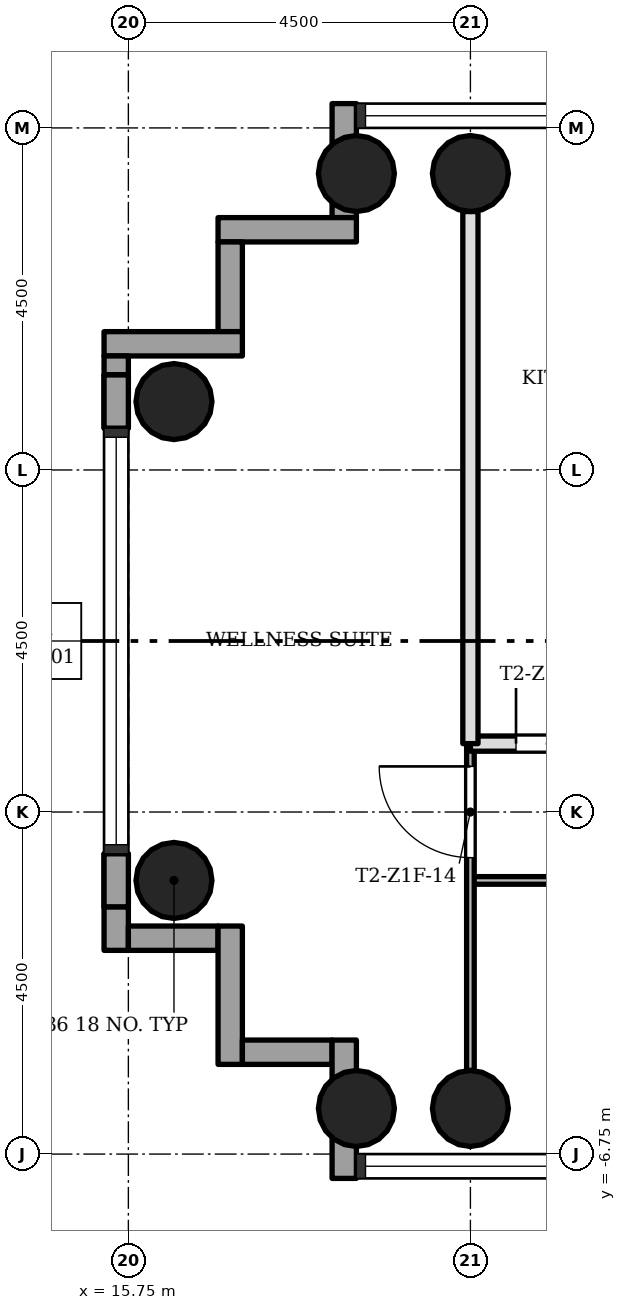
"""IFC4 building model, lengths in metres.
Left out: names, types, materials, properties, quantities, classifications, styles, units other than length and angle.
Written with IfcOpenShell. Run it as: python <this file> out.ifc"""

import sys

from ifc_helpers import new_model, si_unit, direction, frame, frame_2d, origin, origin_2d, place, context, subcontext, project, spatial, rectangle, hollow_circle, extrude, element, fill, save


model = new_model("IFC4")
c1 = context("Model", 3, precision=1e-05, world=origin(), true_north=direction((0.0, 1.0)))
c2 = subcontext(c1, "Body", "Model", "MODEL_VIEW")
j1 = project(units=[si_unit("LENGTHUNIT", "METRE"), si_unit("PLANEANGLEUNIT", "RADIAN")], contexts=[c1])
p1 = place(None, origin())
s1 = spatial("IfcSite", under=j1, at=p1, CompositionType="ELEMENT")
p2 = place(p1, origin())
s2 = spatial("IfcBuilding", under=s1, at=p2, CompositionType="ELEMENT")
p3 = place(p2, frame((0.0, 0.0, 68.7)))
s3 = spatial("IfcBuildingStorey", under=s2, at=p3, CompositionType="ELEMENT", Elevation=68.7)
for number, where, z_axis, x_axis in (
    (1, (20.25, 6.15, 0.0), (0.0, 0.0, 1.0), (1.0, 0.0, 0.0)),
    (2, (20.25, -6.15, 0.0), (0.0, 0.0, 1.0), (1.0, 0.0, 0.0)),
    (3, (18.75, 6.15, 0.0), (0.0, 0.0, 1.0), (1.0, 0.0, 0.0)),
    (4, (18.75, -6.15, 0.0), (0.0, 0.0, 1.0), (1.0, 0.0, 0.0)),
    (5, (16.35, 3.15, 0.0), (0.0, 0.0, 1.0), (1.0, 0.0, 0.0)),
    (6, (16.35, -3.15, 0.0), (0.0, 0.0, 1.0), (1.0, 0.0, 0.0)),
):
    element("IfcColumn", number, at=place(p3, frame(where, z_axis=z_axis, x_axis=x_axis)), inside=s3, PredefinedType="COLUMN", context=c2, shape_type="SweptSolid", body=[
        extrude(hollow_circle(Radius=0.5, WallThickness=0.036, at=origin_2d()), origin(), (0.0, 0.0, 1.0), 3.4),
    ])
p4 = place(p3, frame((18.59, 7.07, -0.3), z_axis=(0.0, 0.0, 1.0), x_axis=(0.0, -1.0, 0.0)))
e7 = element("IfcWall", 7, at=p4, inside=s3, PredefinedType="STANDARD", context=c2, shape_type="SweptSolid", body=[
    extrude(rectangle(XDim=1.5, YDim=0.32, at=frame_2d((0.75, 0.0))), origin(), (0.0, 0.0, 1.0), 3.4),
])
p5 = place(p3, frame((18.75, 5.41, -0.3), z_axis=(0.0, 0.0, 1.0), x_axis=(-1.0, 0.0, 0.0)))
e8 = element("IfcWall", 8, at=p5, inside=s3, PredefinedType="STANDARD", context=c2, shape_type="SweptSolid", body=[
    extrude(rectangle(XDim=1.82, YDim=0.32, at=frame_2d((0.91, 0.0))), origin(), (0.0, 0.0, 1.0), 3.4),
])
p6 = place(p3, frame((17.09, 5.25, -0.3), z_axis=(0.0, 0.0, 1.0), x_axis=(0.0, -1.0, 0.0)))
e9 = element("IfcWall", 9, at=p6, inside=s3, PredefinedType="STANDARD", context=c2, shape_type="SweptSolid", body=[
    extrude(rectangle(XDim=1.18, YDim=0.32, at=frame_2d((0.59, 0.0))), origin(), (0.0, 0.0, 1.0), 3.4),
])
p7 = place(p3, frame((17.25, 3.91, -0.3), z_axis=(0.0, 0.0, 1.0), x_axis=(-1.0, 0.0, 0.0)))
e10 = element("IfcWall", 10, at=p7, inside=s3, PredefinedType="STANDARD", context=c2, shape_type="SweptSolid", body=[
    extrude(rectangle(XDim=1.82, YDim=0.32, at=frame_2d((0.91, 0.0))), origin(), (0.0, 0.0, 1.0), 3.4),
])
p8 = place(p3, frame((15.59, 3.75, 0.0), z_axis=(0.0, 0.0, 1.0), x_axis=(0.0, -1.0, 0.0)))
e11 = element("IfcWall", 11, at=p8, inside=s3, PredefinedType="STANDARD", context=c2, shape_type="SweptSolid", body=[
    extrude(rectangle(XDim=0.25, YDim=0.32, at=frame_2d((0.125, 0.0))), origin(), (0.0, 0.0, 1.0), 3.1),
])
p9 = place(p3, frame((15.59, 3.5, 0.0), z_axis=(0.0, 0.0, 1.0), x_axis=(0.0, -1.0, 0.0)))
e12 = element("IfcWall", 12, at=p9, inside=s3, PredefinedType="STANDARD", context=c2, shape_type="SweptSolid", body=[
    extrude(rectangle(XDim=0.7, YDim=0.32, at=frame_2d((0.35, 0.0))), origin(), (0.0, 0.0, 1.0), 2.51),
])
p10 = place(p3, frame((15.59, 3.5, 2.98), z_axis=(0.0, 0.0, 1.0), x_axis=(0.0, -1.0, 0.0)))
e13 = element("IfcWall", 13, at=p10, inside=s3, PredefinedType="STANDARD", context=c2, shape_type="SweptSolid", body=[
    extrude(rectangle(XDim=0.7, YDim=0.32, at=frame_2d((0.35, 0.0))), origin(), (0.0, 0.0, 1.0), 0.12),
])
p11 = place(p3, frame((15.59, -2.8, 0.0), z_axis=(0.0, 0.0, 1.0), x_axis=(0.0, -1.0, 0.0)))
e14 = element("IfcWall", 14, at=p11, inside=s3, PredefinedType="STANDARD", context=c2, shape_type="SweptSolid", body=[
    extrude(rectangle(XDim=0.7, YDim=0.32, at=frame_2d((0.35, 0.0))), origin(), (0.0, 0.0, 1.0), 2.51),
])
p12 = place(p3, frame((15.59, -2.8, 2.98), z_axis=(0.0, 0.0, 1.0), x_axis=(0.0, -1.0, 0.0)))
e15 = element("IfcWall", 15, at=p12, inside=s3, PredefinedType="STANDARD", context=c2, shape_type="SweptSolid", body=[
    extrude(rectangle(XDim=0.7, YDim=0.32, at=frame_2d((0.35, 0.0))), origin(), (0.0, 0.0, 1.0), 0.12),
])
p13 = place(p3, frame((15.59, -3.5, 0.0), z_axis=(0.0, 0.0, 1.0), x_axis=(0.0, -1.0, 0.0)))
e16 = element("IfcWall", 16, at=p13, inside=s3, PredefinedType="STANDARD", context=c2, shape_type="SweptSolid", body=[
    extrude(rectangle(XDim=0.57, YDim=0.32, at=frame_2d((0.285, 0.0))), origin(), (0.0, 0.0, 1.0), 3.1),
])
p14 = place(p3, frame((15.75, -3.91, -0.3), z_axis=(0.0, 0.0, 1.0), x_axis=(1.0, 0.0, 0.0)))
e17 = element("IfcWall", 17, at=p14, inside=s3, PredefinedType="STANDARD", context=c2, shape_type="SweptSolid", body=[
    extrude(rectangle(XDim=1.18, YDim=0.32, at=frame_2d((0.59, 0.0))), origin(), (0.0, 0.0, 1.0), 3.4),
])
p15 = place(p3, frame((17.09, -3.75, -0.3), z_axis=(0.0, 0.0, 1.0), x_axis=(0.0, -1.0, 0.0)))
e18 = element("IfcWall", 18, at=p15, inside=s3, PredefinedType="STANDARD", context=c2, shape_type="SweptSolid", body=[
    extrude(rectangle(XDim=1.82, YDim=0.32, at=frame_2d((0.91, 0.0))), origin(), (0.0, 0.0, 1.0), 3.4),
])
p16 = place(p3, frame((17.25, -5.41, -0.3), z_axis=(0.0, 0.0, 1.0), x_axis=(1.0, 0.0, 0.0)))
e19 = element("IfcWall", 19, at=p16, inside=s3, PredefinedType="STANDARD", context=c2, shape_type="SweptSolid", body=[
    extrude(rectangle(XDim=1.18, YDim=0.32, at=frame_2d((0.59, 0.0))), origin(), (0.0, 0.0, 1.0), 3.4),
])
p17 = place(p3, frame((18.59, -5.25, -0.3), z_axis=(0.0, 0.0, 1.0), x_axis=(0.0, -1.0, 0.0)))
e20 = element("IfcWall", 20, at=p17, inside=s3, PredefinedType="STANDARD", context=c2, shape_type="SweptSolid", body=[
    extrude(rectangle(XDim=1.82, YDim=0.32, at=frame_2d((0.91, 0.0))), origin(), (0.0, 0.0, 1.0), 3.4),
])
p18 = place(p3, frame((29.25, -3.15, 0.0), z_axis=(0.0, 0.0, 1.0), x_axis=(-1.0, 0.0, 0.0)))
e21 = element("IfcWall", 21, at=p18, inside=s3, PredefinedType="PARTITIONING", context=c2, shape_type="SweptSolid", body=[
    extrude(rectangle(XDim=9.0, YDim=0.1, at=frame_2d((4.5, 0.0))), origin(), (0.0, 0.0, 1.0), 3.0),
])
p19 = place(p18, frame((1.8, 0.0, 0.0)))
e22 = element("IfcOpeningElement", 22, at=p19, cuts=e21, PredefinedType="OPENING", context=c2, shape_type="SweptSolid", body=[
    extrude(rectangle(XDim=0.9, YDim=2.1, at=frame_2d((0.45, 1.05))), frame((0.0, 0.06, 0.0), z_axis=(0.0, -1.0, 0.0), x_axis=(1.0, 0.0, 0.0)), (0.0, 0.0, 1.0), 0.12),
])
p20 = place(p18, frame((6.3, 0.0, 0.0)))
e23 = element("IfcOpeningElement", 23, at=p20, cuts=e21, PredefinedType="OPENING", context=c2, shape_type="SweptSolid", body=[
    extrude(rectangle(XDim=0.9, YDim=2.1, at=frame_2d((0.45, 1.05))), frame((0.0, 0.06, 0.0), z_axis=(0.0, -1.0, 0.0), x_axis=(1.0, 0.0, 0.0)), (0.0, 0.0, 1.0), 0.12),
])
p21 = place(p3, frame((24.75, -1.35, 0.0), z_axis=(0.0, 0.0, 1.0), x_axis=(-1.0, 0.0, 0.0)))
e24 = element("IfcWall", 24, at=p21, inside=s3, PredefinedType="SOLIDWALL", context=c2, shape_type="SweptSolid", body=[
    extrude(rectangle(XDim=4.5, YDim=0.2, at=frame_2d((2.25, 0.0))), origin(), (0.0, 0.0, 1.0), 3.0),
])
p22 = place(p21, frame((3.0, 0.0, 0.0)))
e25 = element("IfcOpeningElement", 25, at=p22, cuts=e24, PredefinedType="OPENING", context=c2, shape_type="SweptSolid", body=[
    extrude(rectangle(XDim=0.9, YDim=2.1, at=frame_2d((0.45, 1.05))), frame((0.0, 0.11, 0.0), z_axis=(0.0, -1.0, 0.0), x_axis=(1.0, 0.0, 0.0)), (0.0, 0.0, 1.0), 0.22),
])
p23 = place(p3, frame((20.25, -5.65, 0.0), z_axis=(0.0, 0.0, 1.0), x_axis=(0.0, 1.0, 0.0)))
e26 = element("IfcWall", 26, at=p23, inside=s3, PredefinedType="PARTITIONING", context=c2, shape_type="SweptSolid", body=[
    extrude(rectangle(XDim=4.3, YDim=0.1, at=frame_2d((2.15, 0.0))), origin(), (0.0, 0.0, 1.0), 3.0),
])
p24 = place(p23, frame((2.8, 0.0, 0.0)))
e27 = element("IfcOpeningElement", 27, at=p24, cuts=e26, PredefinedType="OPENING", context=c2, shape_type="SweptSolid", body=[
    extrude(rectangle(XDim=1.2, YDim=2.1, at=frame_2d((0.6, 1.05))), frame((0.0, 0.06, 0.0), z_axis=(0.0, -1.0, 0.0), x_axis=(1.0, 0.0, 0.0)), (0.0, 0.0, 1.0), 0.12),
])
p25 = place(p3, frame((20.25, -1.35, 0.0), z_axis=(0.0, 0.0, 1.0), x_axis=(0.0, 1.0, 0.0)))
e28 = element("IfcWall", 28, at=p25, inside=s3, PredefinedType="SOLIDWALL", context=c2, shape_type="SweptSolid", body=[
    extrude(rectangle(XDim=7.0, YDim=0.2, at=frame_2d((3.5, 0.0))), origin(), (0.0, 0.0, 1.0), 3.0),
])
p26 = place(p22, origin())
e29 = element("IfcDoor", 29, at=p26, inside=s3, OperationType="SINGLE_SWING_RIGHT", PredefinedType="DOOR", context=c2, shape_type="SweptSolid", body=[
    extrude(rectangle(XDim=0.9, YDim=2.1, at=frame_2d((0.45, 1.05))), frame((0.0, 0.025, 0.0), z_axis=(0.0, -1.0, 0.0), x_axis=(1.0, 0.0, 0.0)), (0.0, 0.0, 1.0), 0.05),
])
fill(e25, e29)
p27 = place(p24, origin())
e30 = element("IfcDoor", 30, at=p27, inside=s3, OperationType="SINGLE_SWING_LEFT", PredefinedType="DOOR", context=c2, shape_type="SweptSolid", body=[
    extrude(rectangle(XDim=1.2, YDim=2.1, at=frame_2d((0.6, 1.05))), frame((0.0, 0.025, 0.0), z_axis=(0.0, -1.0, 0.0), x_axis=(1.0, 0.0, 0.0)), (0.0, 0.0, 1.0), 0.05),
])
fill(e27, e30)
save(model, sys.argv[1])
